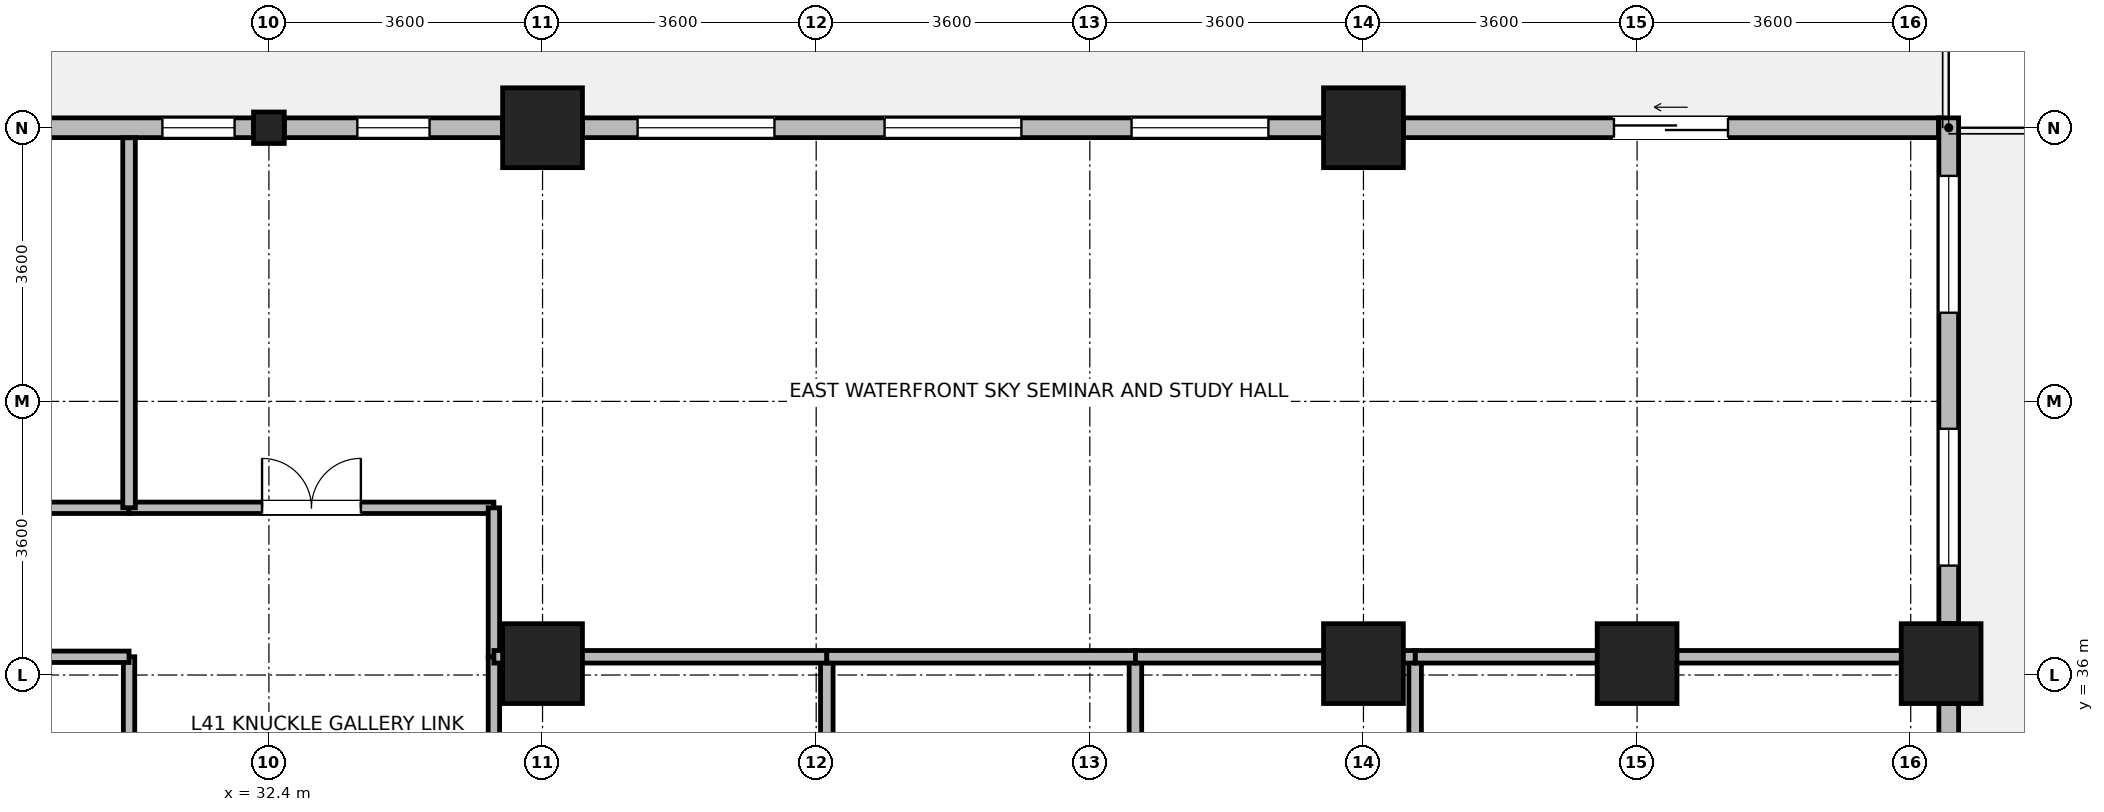
"""IFC4 building model, lengths in metres.
Left out: names, types, materials, properties, quantities, classifications, styles, units other than length and angle.
Written with IfcOpenShell. Run it as: python <this file> out.ifc"""

import sys

from ifc_helpers import new_model, si_unit, direction, frame, frame_2d, origin, origin_2d, place, context, subcontext, project, spatial, rectangle, i_section, extrude, source, transform, mapped, element, fill, save


model = new_model("IFC4")
c1 = context("Model", 3, precision=1e-05, world=origin(), true_north=direction((0.0, 1.0)))
c2 = subcontext(c1, "Body", "Model", "MODEL_VIEW")
j1 = project(units=[si_unit("LENGTHUNIT", "METRE"), si_unit("PLANEANGLEUNIT", "RADIAN")], contexts=[c1])
p1 = place(None, origin())
s1 = spatial("IfcSite", under=j1, at=p1, CompositionType="ELEMENT")
p2 = place(p1, origin())
s2 = spatial("IfcBuilding", under=s1, at=p2, CompositionType="ELEMENT")
p3 = place(p2, frame((0.0, 0.0, 162.4)))
s3 = spatial("IfcBuildingStorey", under=s2, at=p3, CompositionType="ELEMENT", Elevation=162.4)
m1 = source(origin(), c2, "Body", "SweptSolid", [
    extrude(rectangle(XDim=1.05, YDim=1.05, at=origin_2d()), origin(), (0.0, 0.0, 1.0), 3.7),
])
for number, where, z_axis, x_axis in (
    (1, (36.0, 43.2, 0.0), (0.0, 0.0, 1.0), (1.0, 0.0, 0.0)),
    (2, (36.0, 36.15, 0.0), (0.0, 0.0, 1.0), (1.0, 0.0, 0.0)),
    (3, (46.8, 36.15, 0.0), (0.0, 0.0, 1.0), (1.0, 0.0, 0.0)),
    (4, (46.8, 43.2, 0.0), (0.0, 0.0, 1.0), (1.0, 0.0, 0.0)),
    (5, (50.4, 36.15, 0.0), (0.0, 0.0, 1.0), (1.0, 0.0, 0.0)),
    (6, (54.4, 36.15, 0.0), (0.0, 0.0, 1.0), (1.0, 0.0, 0.0)),
):
    element("IfcColumn", number, at=place(p3, frame(where, z_axis=z_axis, x_axis=x_axis)), inside=s3, PredefinedType="COLUMN", context=c2, shape_type="MappedRepresentation", body=[
        mapped(m1, transform((0.0, 0.0, 0.0), x_axis=(1.0, 0.0, 0.0), y_axis=(0.0, 1.0, 0.0), z_axis=(0.0, 0.0, 1.0), scale=1.0)),
    ])
m2 = source(origin(), c2, "Body", "SweptSolid", [
    extrude(i_section(OverallWidth=0.404, OverallDepth=0.414, WebThickness=0.021, FlangeThickness=0.028, FilletRadius=0.015, at=origin_2d()), origin(), (0.0, 0.0, 1.0), 3.7),
])
p4 = place(p3, frame((32.4, 43.2, 0.0), z_axis=(0.0, 0.0, 1.0), x_axis=(1.0, 0.0, 0.0)))
e7 = element("IfcColumn", 7, at=p4, inside=s3, PredefinedType="COLUMN", context=c2, shape_type="MappedRepresentation", body=[
    mapped(m2, transform((0.0, 0.0, 0.0), x_axis=(1.0, 0.0, 0.0), y_axis=(0.0, 1.0, 0.0), z_axis=(0.0, 0.0, 1.0), scale=1.0)),
])
p5 = place(p3, frame((54.5, 35.624, 0.0), z_axis=(0.0, 0.0, 1.0), x_axis=(0.0, -1.0, 0.0)))
e8 = element("IfcWall", 8, at=p5, inside=s3, PredefinedType="STANDARD", context=c2, shape_type="SweptSolid", body=[
    extrude(rectangle(XDim=6.448, YDim=0.26, at=frame_2d((3.224, 0.0))), origin(), (0.0, 0.0, 1.0), 2.99),
])
p6 = place(p5, frame((0.712, 0.0, 0.85)))
e9 = element("IfcOpeningElement", 9, at=p6, cuts=e8, PredefinedType="OPENING", context=c2, shape_type="SweptSolid", body=[
    extrude(rectangle(XDim=1.8, YDim=1.85, at=frame_2d((0.9, 0.925))), frame((0.0, 0.14, 0.0), z_axis=(0.0, -1.0, 0.0), x_axis=(1.0, 0.0, 0.0)), (0.0, 0.0, 1.0), 0.28),
])
p7 = place(p5, frame((3.936, 0.0, 0.85)))
e10 = element("IfcOpeningElement", 10, at=p7, cuts=e8, PredefinedType="OPENING", context=c2, shape_type="SweptSolid", body=[
    extrude(rectangle(XDim=1.8, YDim=1.85, at=frame_2d((0.9, 0.925))), frame((0.0, 0.14, 0.0), z_axis=(0.0, -1.0, 0.0), x_axis=(1.0, 0.0, 0.0)), (0.0, 0.0, 1.0), 0.28),
])
p8 = place(p3, frame((54.5, 43.33, 0.0), z_axis=(0.0, 0.0, 1.0), x_axis=(0.0, -1.0, 0.0)))
e11 = element("IfcWall", 11, at=p8, inside=s3, PredefinedType="STANDARD", context=c2, shape_type="SweptSolid", body=[
    extrude(rectangle(XDim=6.654, YDim=0.26, at=frame_2d((3.327, 0.0))), origin(), (0.0, 0.0, 1.0), 3.44),
])
p9 = place(p8, frame((0.763, 0.0, 0.85)))
e12 = element("IfcOpeningElement", 12, at=p9, cuts=e11, PredefinedType="OPENING", context=c2, shape_type="SweptSolid", body=[
    extrude(rectangle(XDim=1.8, YDim=1.85, at=frame_2d((0.9, 0.925))), frame((0.0, 0.14, 0.0), z_axis=(0.0, -1.0, 0.0), x_axis=(1.0, 0.0, 0.0)), (0.0, 0.0, 1.0), 0.28),
])
p10 = place(p8, frame((4.091, 0.0, 0.85)))
e13 = element("IfcOpeningElement", 13, at=p10, cuts=e11, PredefinedType="OPENING", context=c2, shape_type="SweptSolid", body=[
    extrude(rectangle(XDim=1.8, YDim=1.85, at=frame_2d((0.9, 0.925))), frame((0.0, 0.14, 0.0), z_axis=(0.0, -1.0, 0.0), x_axis=(1.0, 0.0, 0.0)), (0.0, 0.0, 1.0), 0.28),
])
p11 = place(p3, frame((47.326, 43.2, 0.0), z_axis=(0.0, 0.0, 1.0), x_axis=(1.0, 0.0, 0.0)))
e14 = element("IfcWall", 14, at=p11, inside=s3, PredefinedType="STANDARD", context=c2, shape_type="SweptSolid", body=[
    extrude(rectangle(XDim=7.039, YDim=0.26, at=frame_2d((3.52, 0.0))), origin(), (0.0, 0.0, 1.0), 3.44),
])
p12 = place(p11, frame((2.77, 0.0, 0.0)))
e15 = element("IfcOpeningElement", 15, at=p12, cuts=e14, PredefinedType="OPENING", context=c2, shape_type="SweptSolid", body=[
    extrude(rectangle(XDim=1.5, YDim=2.15, at=frame_2d((0.75, 1.075))), frame((0.0, 0.14, 0.0), z_axis=(0.0, -1.0, 0.0), x_axis=(1.0, 0.0, 0.0)), (0.0, 0.0, 1.0), 0.28),
])
p13 = place(p3, frame((36.526, 43.2, 0.0), z_axis=(0.0, 0.0, 1.0), x_axis=(1.0, 0.0, 0.0)))
e16 = element("IfcWall", 16, at=p13, inside=s3, PredefinedType="STANDARD", context=c2, shape_type="SweptSolid", body=[
    extrude(rectangle(XDim=9.748, YDim=0.26, at=frame_2d((4.874, 0.0))), origin(), (0.0, 0.0, 1.0), 2.99),
])
p14 = place(p13, frame((0.725, 0.0, 0.85)))
e17 = element("IfcOpeningElement", 17, at=p14, cuts=e16, PredefinedType="OPENING", context=c2, shape_type="SweptSolid", body=[
    extrude(rectangle(XDim=1.8, YDim=1.85, at=frame_2d((0.9, 0.925))), frame((0.0, 0.14, 0.0), z_axis=(0.0, -1.0, 0.0), x_axis=(1.0, 0.0, 0.0)), (0.0, 0.0, 1.0), 0.28),
])
p15 = place(p13, frame((3.974, 0.0, 0.85)))
e18 = element("IfcOpeningElement", 18, at=p15, cuts=e16, PredefinedType="OPENING", context=c2, shape_type="SweptSolid", body=[
    extrude(rectangle(XDim=1.8, YDim=1.85, at=frame_2d((0.9, 0.925))), frame((0.0, 0.14, 0.0), z_axis=(0.0, -1.0, 0.0), x_axis=(1.0, 0.0, 0.0)), (0.0, 0.0, 1.0), 0.28),
])
p16 = place(p13, frame((7.223, 0.0, 0.85)))
e19 = element("IfcOpeningElement", 19, at=p16, cuts=e16, PredefinedType="OPENING", context=c2, shape_type="SweptSolid", body=[
    extrude(rectangle(XDim=1.8, YDim=1.85, at=frame_2d((0.9, 0.925))), frame((0.0, 0.14, 0.0), z_axis=(0.0, -1.0, 0.0), x_axis=(1.0, 0.0, 0.0)), (0.0, 0.0, 1.0), 0.28),
])
p17 = place(p3, frame((32.603, 43.2, 0.0), z_axis=(0.0, 0.0, 1.0), x_axis=(1.0, 0.0, 0.0)))
e20 = element("IfcWall", 20, at=p17, inside=s3, PredefinedType="STANDARD", context=c2, shape_type="SweptSolid", body=[
    extrude(rectangle(XDim=2.871, YDim=0.26, at=frame_2d((1.436, 0.0))), origin(), (0.0, 0.0, 1.0), 2.99),
])
p18 = place(p17, frame((0.96, 0.0, 0.85)))
e21 = element("IfcOpeningElement", 21, at=p18, cuts=e20, PredefinedType="OPENING", context=c2, shape_type="SweptSolid", body=[
    extrude(rectangle(XDim=0.95, YDim=1.75, at=frame_2d((0.475, 0.875))), frame((0.0, 0.14, 0.0), z_axis=(0.0, -1.0, 0.0), x_axis=(1.0, 0.0, 0.0)), (0.0, 0.0, 1.0), 0.28),
])
p19 = place(p3, frame((29.326, 43.2, 0.0), z_axis=(0.0, 0.0, 1.0), x_axis=(1.0, 0.0, 0.0)))
e22 = element("IfcWall", 22, at=p19, inside=s3, PredefinedType="STANDARD", context=c2, shape_type="SweptSolid", body=[
    extrude(rectangle(XDim=2.871, YDim=0.26, at=frame_2d((1.436, 0.0))), origin(), (0.0, 0.0, 1.0), 2.99),
])
p20 = place(p19, frame((1.673, 0.0, 0.85)))
e23 = element("IfcOpeningElement", 23, at=p20, cuts=e22, PredefinedType="OPENING", context=c2, shape_type="SweptSolid", body=[
    extrude(rectangle(XDim=0.95, YDim=1.75, at=frame_2d((0.475, 0.875))), frame((0.0, 0.14, 0.0), z_axis=(0.0, -1.0, 0.0), x_axis=(1.0, 0.0, 0.0)), (0.0, 0.0, 1.0), 0.28),
])
p21 = place(p3, frame((22.74, 38.2, 0.0), z_axis=(0.0, 0.0, 1.0), x_axis=(1.0, 0.0, 0.0)))
e24 = element("IfcWall", 24, at=p21, inside=s3, PredefinedType="PARTITIONING", context=c2, shape_type="SweptSolid", body=[
    extrude(rectangle(XDim=7.82, YDim=0.15, at=frame_2d((3.91, 0.0))), origin(), (0.0, 0.0, 1.0), 3.44),
])
p22 = place(p21, frame((3.46, 0.0, 0.0)))
e25 = element("IfcOpeningElement", 25, at=p22, cuts=e24, PredefinedType="OPENING", context=c2, shape_type="SweptSolid", body=[
    extrude(rectangle(XDim=0.9, YDim=2.08, at=frame_2d((0.45, 1.04))), frame((0.0, 0.085, 0.0), z_axis=(0.0, -1.0, 0.0), x_axis=(1.0, 0.0, 0.0)), (0.0, 0.0, 1.0), 0.17),
])
p23 = place(p3, frame((35.36, 28.56, 0.0), z_axis=(0.0, 0.0, 1.0), x_axis=(0.0, 1.0, 0.0)))
e26 = element("IfcWall", 26, at=p23, inside=s3, PredefinedType="PARTITIONING", context=c2, shape_type="SweptSolid", body=[
    extrude(rectangle(XDim=7.68, YDim=0.15, at=frame_2d((3.84, 0.0))), origin(), (0.0, 0.0, 1.0), 3.44),
])
p24 = place(p23, frame((3.19, 0.0, 0.0)))
e27 = element("IfcOpeningElement", 27, at=p24, cuts=e26, PredefinedType="OPENING", context=c2, shape_type="SweptSolid", body=[
    extrude(rectangle(XDim=1.3, YDim=2.12, at=frame_2d((0.65, 1.06))), frame((0.0, 0.085, 0.0), z_axis=(0.0, -1.0, 0.0), x_axis=(1.0, 0.0, 0.0)), (0.0, 0.0, 1.0), 0.17),
])
p25 = place(p3, frame((30.56, 38.2, 0.0), z_axis=(0.0, 0.0, 1.0), x_axis=(1.0, 0.0, 0.0)))
e28 = element("IfcWall", 28, at=p25, inside=s3, PredefinedType="PARTITIONING", context=c2, shape_type="SweptSolid", body=[
    extrude(rectangle(XDim=4.8, YDim=0.15, at=frame_2d((2.4, 0.0))), origin(), (0.0, 0.0, 1.0), 3.44),
])
p26 = place(p25, frame((1.75, 0.0, 0.0)))
e29 = element("IfcOpeningElement", 29, at=p26, cuts=e28, PredefinedType="OPENING", context=c2, shape_type="SweptSolid", body=[
    extrude(rectangle(XDim=1.3, YDim=2.12, at=frame_2d((0.65, 1.06))), frame((0.0, 0.085, 0.0), z_axis=(0.0, -1.0, 0.0), x_axis=(1.0, 0.0, 0.0)), (0.0, 0.0, 1.0), 0.17),
])
p27 = place(p3, frame((30.56, 31.64, 0.0), z_axis=(0.0, 0.0, 1.0), x_axis=(0.0, 1.0, 0.0)))
e30 = element("IfcWall", 30, at=p27, inside=s3, PredefinedType="PARTITIONING", context=c2, shape_type="SweptSolid", body=[
    extrude(rectangle(XDim=4.6, YDim=0.15, at=frame_2d((2.3, 0.0))), origin(), (0.0, 0.0, 1.0), 3.44),
])
p28 = place(p27, frame((1.65, 0.0, 0.0)))
e31 = element("IfcOpeningElement", 31, at=p28, cuts=e30, PredefinedType="OPENING", context=c2, shape_type="SweptSolid", body=[
    extrude(rectangle(XDim=1.3, YDim=2.12, at=frame_2d((0.65, 1.06))), frame((0.0, 0.085, 0.0), z_axis=(0.0, -1.0, 0.0), x_axis=(1.0, 0.0, 0.0)), (0.0, 0.0, 1.0), 0.17),
])
p29 = place(p3, frame((35.36, 36.24, 0.0), z_axis=(0.0, 0.0, 1.0), x_axis=(0.0, 1.0, 0.0)))
e32 = element("IfcWall", 32, at=p29, inside=s3, PredefinedType="PARTITIONING", context=c2, shape_type="SweptSolid", body=[
    extrude(rectangle(XDim=1.96, YDim=0.15, at=frame_2d((0.98, 0.0))), origin(), (0.0, 0.0, 1.0), 3.44),
])
p30 = place(p3, frame((29.325, 36.24, 0.0), z_axis=(0.0, 0.0, 1.0), x_axis=(1.0, 0.0, 0.0)))
e33 = element("IfcWall", 33, at=p30, inside=s3, PredefinedType="PARTITIONING", context=c2, shape_type="SweptSolid", body=[
    extrude(rectangle(XDim=1.235, YDim=0.15, at=frame_2d((0.618, 0.0))), origin(), (0.0, 0.0, 1.0), 2.84),
])
for number, where, z_axis, x_axis in (
    (34, (39.74, 28.56, 0.0), (0.0, 0.0, 1.0), (0.0, 1.0, 0.0)),
    (35, (43.8, 28.56, 0.0), (0.0, 0.0, 1.0), (0.0, 1.0, 0.0)),
    (36, (47.48, 28.56, 0.0), (0.0, 0.0, 1.0), (0.0, 1.0, 0.0)),
):
    element("IfcWall", number, at=place(p3, frame(where, z_axis=z_axis, x_axis=x_axis)), inside=s3, PredefinedType="PARTITIONING", context=c2, shape_type="SweptSolid", body=[
        extrude(rectangle(XDim=7.68, YDim=0.165, at=frame_2d((3.84, 0.0))), origin(), (0.0, 0.0, 1.0), 3.44),
    ])
p31 = place(p3, frame((47.48, 36.24, 0.0), z_axis=(0.0, 0.0, 1.0), x_axis=(1.0, 0.0, 0.0)))
e37 = element("IfcWall", 37, at=p31, inside=s3, PredefinedType="PARTITIONING", context=c2, shape_type="SweptSolid", body=[
    extrude(rectangle(XDim=6.888, YDim=0.165, at=frame_2d((3.444, 0.0))), origin(), (0.0, 0.0, 1.0), 2.84),
])
p32 = place(p3, frame((30.56, 38.2, 0.0), z_axis=(0.0, 0.0, 1.0), x_axis=(0.0, 1.0, 0.0)))
e38 = element("IfcWall", 38, at=p32, inside=s3, PredefinedType="PARTITIONING", context=c2, shape_type="SweptSolid", body=[
    extrude(rectangle(XDim=4.868, YDim=0.165, at=frame_2d((2.434, 0.0))), origin(), (0.0, 0.0, 1.0), 3.44),
])
p33 = place(p3, frame((35.36, 36.24, 0.0), z_axis=(0.0, 0.0, 1.0), x_axis=(1.0, 0.0, 0.0)))
e39 = element("IfcWall", 39, at=p33, inside=s3, PredefinedType="PARTITIONING", context=c2, shape_type="SweptSolid", body=[
    extrude(rectangle(XDim=4.38, YDim=0.165, at=frame_2d((2.19, 0.0))), origin(), (0.0, 0.0, 1.0), 2.84),
])
p34 = place(p3, frame((39.74, 36.24, 0.0), z_axis=(0.0, 0.0, 1.0), x_axis=(1.0, 0.0, 0.0)))
e40 = element("IfcWall", 40, at=p34, inside=s3, PredefinedType="PARTITIONING", context=c2, shape_type="SweptSolid", body=[
    extrude(rectangle(XDim=4.06, YDim=0.165, at=frame_2d((2.03, 0.0))), origin(), (0.0, 0.0, 1.0), 2.84),
])
p35 = place(p3, frame((43.8, 36.24, 0.0), z_axis=(0.0, 0.0, 1.0), x_axis=(1.0, 0.0, 0.0)))
e41 = element("IfcWall", 41, at=p35, inside=s3, PredefinedType="PARTITIONING", context=c2, shape_type="SweptSolid", body=[
    extrude(rectangle(XDim=3.68, YDim=0.165, at=frame_2d((1.84, 0.0))), origin(), (0.0, 0.0, 1.0), 2.84),
])
p36 = place(p9, origin())
e42 = element("IfcWindow", 42, at=p36, inside=s3, PartitioningType="SINGLE_PANEL", PredefinedType="WINDOW", context=c2, shape_type="SweptSolid", body=[
    extrude(rectangle(XDim=1.8, YDim=1.85, at=frame_2d((0.9, 0.925))), frame((0.0, 0.03, 0.0), z_axis=(0.0, -1.0, 0.0), x_axis=(1.0, 0.0, 0.0)), (0.0, 0.0, 1.0), 0.06),
])
fill(e12, e42)
p37 = place(p10, origin())
e43 = element("IfcWindow", 43, at=p37, inside=s3, PartitioningType="SINGLE_PANEL", PredefinedType="WINDOW", context=c2, shape_type="SweptSolid", body=[
    extrude(rectangle(XDim=1.8, YDim=1.85, at=frame_2d((0.9, 0.925))), frame((0.0, 0.03, 0.0), z_axis=(0.0, -1.0, 0.0), x_axis=(1.0, 0.0, 0.0)), (0.0, 0.0, 1.0), 0.06),
])
fill(e13, e43)
p38 = place(p12, origin())
e44 = element("IfcDoor", 44, at=p38, inside=s3, OperationType="SLIDING_TO_LEFT", PredefinedType="DOOR", context=c2, shape_type="SweptSolid", body=[
    extrude(rectangle(XDim=1.5, YDim=2.15, at=frame_2d((0.75, 1.075))), frame((0.0, 0.025, 0.0), z_axis=(0.0, -1.0, 0.0), x_axis=(1.0, 0.0, 0.0)), (0.0, 0.0, 1.0), 0.05),
])
fill(e15, e44)
p39 = place(p14, origin())
e45 = element("IfcWindow", 45, at=p39, inside=s3, PartitioningType="SINGLE_PANEL", PredefinedType="WINDOW", context=c2, shape_type="SweptSolid", body=[
    extrude(rectangle(XDim=1.8, YDim=1.85, at=frame_2d((0.9, 0.925))), frame((0.0, 0.03, 0.0), z_axis=(0.0, -1.0, 0.0), x_axis=(1.0, 0.0, 0.0)), (0.0, 0.0, 1.0), 0.06),
])
fill(e17, e45)
p40 = place(p15, origin())
e46 = element("IfcWindow", 46, at=p40, inside=s3, PartitioningType="SINGLE_PANEL", PredefinedType="WINDOW", context=c2, shape_type="SweptSolid", body=[
    extrude(rectangle(XDim=1.8, YDim=1.85, at=frame_2d((0.9, 0.925))), frame((0.0, 0.03, 0.0), z_axis=(0.0, -1.0, 0.0), x_axis=(1.0, 0.0, 0.0)), (0.0, 0.0, 1.0), 0.06),
])
fill(e18, e46)
p41 = place(p16, origin())
e47 = element("IfcWindow", 47, at=p41, inside=s3, PartitioningType="SINGLE_PANEL", PredefinedType="WINDOW", context=c2, shape_type="SweptSolid", body=[
    extrude(rectangle(XDim=1.8, YDim=1.85, at=frame_2d((0.9, 0.925))), frame((0.0, 0.03, 0.0), z_axis=(0.0, -1.0, 0.0), x_axis=(1.0, 0.0, 0.0)), (0.0, 0.0, 1.0), 0.06),
])
fill(e19, e47)
p42 = place(p18, origin())
e48 = element("IfcWindow", 48, at=p42, inside=s3, PartitioningType="SINGLE_PANEL", PredefinedType="WINDOW", context=c2, shape_type="SweptSolid", body=[
    extrude(rectangle(XDim=0.95, YDim=1.75, at=frame_2d((0.475, 0.875))), frame((0.0, 0.03, 0.0), z_axis=(0.0, -1.0, 0.0), x_axis=(1.0, 0.0, 0.0)), (0.0, 0.0, 1.0), 0.06),
])
fill(e21, e48)
p43 = place(p20, origin())
e49 = element("IfcWindow", 49, at=p43, inside=s3, PartitioningType="SINGLE_PANEL", PredefinedType="WINDOW", context=c2, shape_type="SweptSolid", body=[
    extrude(rectangle(XDim=0.95, YDim=1.75, at=frame_2d((0.475, 0.875))), frame((0.0, 0.03, 0.0), z_axis=(0.0, -1.0, 0.0), x_axis=(1.0, 0.0, 0.0)), (0.0, 0.0, 1.0), 0.06),
])
fill(e23, e49)
p44 = place(p26, origin())
e50 = element("IfcDoor", 50, at=p44, inside=s3, OperationType="DOUBLE_DOOR_SINGLE_SWING", PredefinedType="DOOR", context=c2, shape_type="SweptSolid", body=[
    extrude(rectangle(XDim=1.3, YDim=2.12, at=frame_2d((0.65, 1.06))), frame((0.0, 0.025, 0.0), z_axis=(0.0, -1.0, 0.0), x_axis=(1.0, 0.0, 0.0)), (0.0, 0.0, 1.0), 0.05),
])
fill(e29, e50)
save(model, sys.argv[1])
